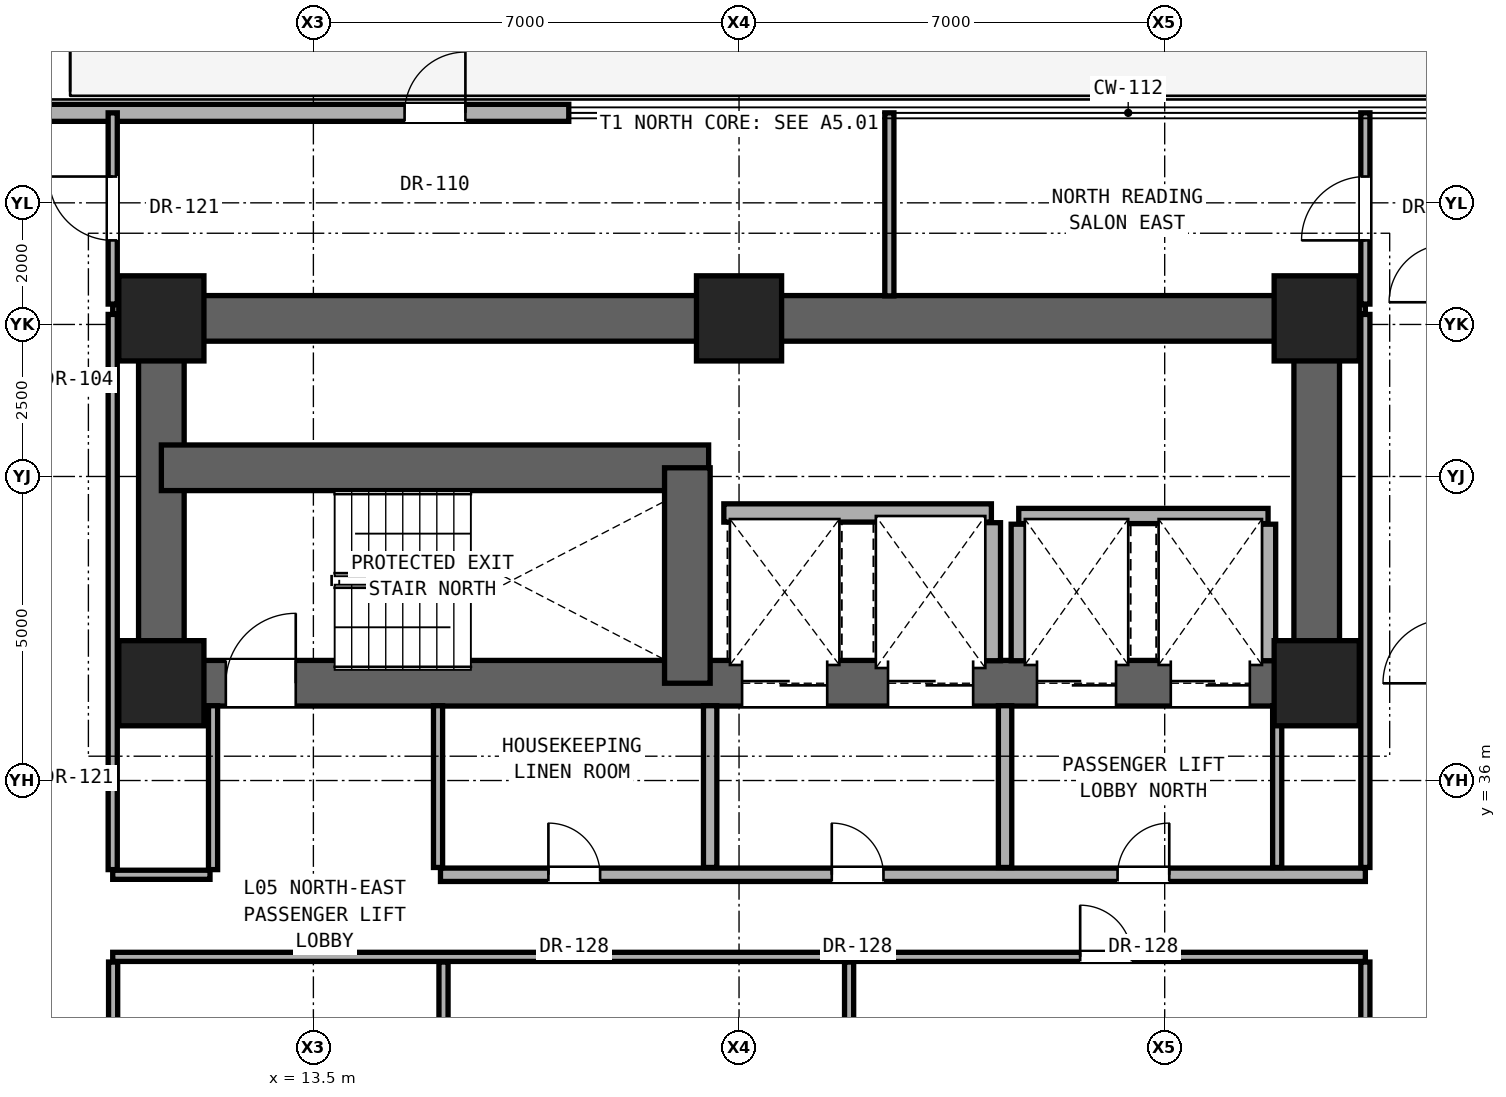
"""IFC4 building model, lengths in metres.
Left out: names, types, materials, properties, quantities, classifications, styles, units other than length and angle.
Written with IfcOpenShell. Run it as: python <this file> out.ifc"""

import sys

from ifc_helpers import new_model, si_unit, direction, frame, frame_2d, origin, origin_2d, place, context, subcontext, project, spatial, rectangle, extrude, element, fill, save


model = new_model("IFC4")
c1 = context("Model", 3, precision=1e-05, world=origin(), true_north=direction((0.0, 1.0)))
c2 = subcontext(c1, "Body", "Model", "MODEL_VIEW")
j1 = project(units=[si_unit("LENGTHUNIT", "METRE"), si_unit("PLANEANGLEUNIT", "RADIAN")], contexts=[c1])
p1 = place(None, origin())
s1 = spatial("IfcSite", under=j1, at=p1, CompositionType="ELEMENT")
p2 = place(p1, origin())
s2 = spatial("IfcBuilding", under=s1, at=p2, CompositionType="ELEMENT")
p3 = place(p2, frame((0.0, 0.0, 22.4)))
s3 = spatial("IfcBuildingStorey", under=s2, at=p3, CompositionType="ELEMENT", Elevation=22.4)
for number, where, z_axis, x_axis in (
    (1, (11.0, 37.6, 0.0), (0.0, 0.0, 1.0), (1.0, 0.0, 0.0)),
    (2, (30.0, 37.6, 0.0), (0.0, 0.0, 1.0), (1.0, 0.0, 0.0)),
    (3, (11.0, 43.6, 0.0), (0.0, 0.0, 1.0), (1.0, 0.0, 0.0)),
    (4, (20.5, 43.6, 0.0), (0.0, 0.0, 1.0), (1.0, 0.0, 0.0)),
    (5, (30.0, 43.6, 0.0), (0.0, 0.0, 1.0), (1.0, 0.0, 0.0)),
):
    element("IfcColumn", number, at=place(p3, frame(where, z_axis=z_axis, x_axis=x_axis)), inside=s3, PredefinedType="COLUMN", context=c2, shape_type="SweptSolid", body=[
        extrude(rectangle(XDim=1.4, YDim=1.4, at=origin_2d()), origin(), (0.0, 0.0, 1.0), 3.3),
    ])
p4 = place(p3, frame((11.0, 43.6, 0.0), z_axis=(0.0, 0.0, 1.0), x_axis=(1.0, 0.0, 0.0)))
e6 = element("IfcWall", 6, at=p4, inside=s3, PredefinedType="SHEAR", context=c2, shape_type="SweptSolid", body=[
    extrude(rectangle(XDim=19.0, YDim=0.75, at=frame_2d((9.5, 0.0))), origin(), (0.0, 0.0, 1.0), 3.06),
])
for number, where, z_axis, x_axis in (
    (7, (11.0, 37.6, 0.0), (0.0, 0.0, 1.0), (0.0, 1.0, 0.0)),
    (8, (30.0, 37.6, 0.0), (0.0, 0.0, 1.0), (0.0, 1.0, 0.0)),
):
    element("IfcWall", number, at=place(p3, frame(where, z_axis=z_axis, x_axis=x_axis)), inside=s3, PredefinedType="SHEAR", context=c2, shape_type="SweptSolid", body=[
        extrude(rectangle(XDim=6.0, YDim=0.75, at=frame_2d((3.0, 0.0))), origin(), (0.0, 0.0, 1.0), 3.06),
    ])
p5 = place(p3, frame((11.0, 37.6, 0.0), z_axis=(0.0, 0.0, 1.0), x_axis=(1.0, 0.0, 0.0)))
e9 = element("IfcWall", 9, at=p5, inside=s3, PredefinedType="SHEAR", context=c2, shape_type="SweptSolid", body=[
    extrude(rectangle(XDim=19.0, YDim=0.75, at=frame_2d((9.5, 0.0))), origin(), (0.0, 0.0, 1.0), 3.06),
])
p6 = place(p5, frame((1.06, 0.0, 0.0)))
e10 = element("IfcOpeningElement", 10, at=p6, cuts=e9, PredefinedType="OPENING", context=c2, shape_type="SweptSolid", body=[
    extrude(rectangle(XDim=1.15, YDim=2.2, at=frame_2d((0.575, 1.1))), frame((0.0, 0.385, 0.0), z_axis=(0.0, -1.0, 0.0), x_axis=(1.0, 0.0, 0.0)), (0.0, 0.0, 1.0), 0.77),
])
p7 = place(p5, frame((9.55, 0.0, 0.0)))
e11 = element("IfcOpeningElement", 11, at=p7, cuts=e9, PredefinedType="OPENING", context=c2, shape_type="SweptSolid", body=[
    extrude(rectangle(XDim=1.4, YDim=2.35, at=frame_2d((0.7, 1.175))), frame((0.0, 0.385, 0.0), z_axis=(0.0, -1.0, 0.0), x_axis=(1.0, 0.0, 0.0)), (0.0, 0.0, 1.0), 0.77),
])
p8 = place(p5, frame((11.95, 0.0, 0.0)))
e12 = element("IfcOpeningElement", 12, at=p8, cuts=e9, PredefinedType="OPENING", context=c2, shape_type="SweptSolid", body=[
    extrude(rectangle(XDim=1.4, YDim=2.35, at=frame_2d((0.7, 1.175))), frame((0.0, 0.385, 0.0), z_axis=(0.0, -1.0, 0.0), x_axis=(1.0, 0.0, 0.0)), (0.0, 0.0, 1.0), 0.77),
])
p9 = place(p5, frame((14.4, 0.0, 0.0)))
e13 = element("IfcOpeningElement", 13, at=p9, cuts=e9, PredefinedType="OPENING", context=c2, shape_type="SweptSolid", body=[
    extrude(rectangle(XDim=1.3, YDim=2.3, at=frame_2d((0.65, 1.15))), frame((0.0, 0.385, 0.0), z_axis=(0.0, -1.0, 0.0), x_axis=(1.0, 0.0, 0.0)), (0.0, 0.0, 1.0), 0.77),
])
p10 = place(p5, frame((16.6, 0.0, 0.0)))
e14 = element("IfcOpeningElement", 14, at=p10, cuts=e9, PredefinedType="OPENING", context=c2, shape_type="SweptSolid", body=[
    extrude(rectangle(XDim=1.3, YDim=2.3, at=frame_2d((0.65, 1.15))), frame((0.0, 0.385, 0.0), z_axis=(0.0, -1.0, 0.0), x_axis=(1.0, 0.0, 0.0)), (0.0, 0.0, 1.0), 0.77),
])
p11 = place(p3, frame((11.0, 41.143, 0.0), z_axis=(0.0, 0.0, 1.0), x_axis=(1.0, 0.0, 0.0)))
e15 = element("IfcWall", 15, at=p11, inside=s3, PredefinedType="SHEAR", context=c2, shape_type="SweptSolid", body=[
    extrude(rectangle(XDim=9.0, YDim=0.75, at=frame_2d((4.5, 0.0))), origin(), (0.0, 0.0, 1.0), 3.06),
])
p12 = place(p3, frame((19.65, 37.6, 0.0), z_axis=(0.0, 0.0, 1.0), x_axis=(0.0, 1.0, 0.0)))
e16 = element("IfcWall", 16, at=p12, inside=s3, PredefinedType="SHEAR", context=c2, shape_type="SweptSolid", body=[
    extrude(rectangle(XDim=3.543, YDim=0.75, at=frame_2d((1.771, 0.0))), origin(), (0.0, 0.0, 1.0), 3.06),
])
p13 = place(p3, frame((4.9, 46.98, 0.0), z_axis=(0.0, 0.0, 1.0), x_axis=(1.0, 0.0, 0.0)))
e17 = element("IfcWall", 17, at=p13, inside=s3, PredefinedType="SOLIDWALL", context=c2, shape_type="SweptSolid", body=[
    extrude(rectangle(XDim=12.8, YDim=0.28, at=frame_2d((6.4, 0.0))), origin(), (0.0, 0.0, 1.0), 3.04),
])
p14 = place(p13, frame((10.1, 0.0, 0.0)))
e18 = element("IfcOpeningElement", 18, at=p14, cuts=e17, PredefinedType="OPENING", context=c2, shape_type="SweptSolid", body=[
    extrude(rectangle(XDim=1.0, YDim=2.15, at=frame_2d((0.5, 1.075))), frame((0.0, 0.15, 0.0), z_axis=(0.0, -1.0, 0.0), x_axis=(1.0, 0.0, 0.0)), (0.0, 0.0, 1.0), 0.3),
])
p15 = place(p3, frame((10.2, 33.1, 0.0), z_axis=(0.0, 0.0, 1.0), x_axis=(1.0, 0.0, 0.0)))
e19 = element("IfcWall", 19, at=p15, inside=s3, PredefinedType="PARTITIONING", context=c2, shape_type="SweptSolid", body=[
    extrude(rectangle(XDim=20.6, YDim=0.15, at=frame_2d((10.3, 0.0))), origin(), (0.0, 0.0, 1.0), 2.104),
])
p16 = place(p15, frame((15.91, 0.0, 0.0)))
e20 = element("IfcOpeningElement", 20, at=p16, cuts=e19, PredefinedType="OPENING", context=c2, shape_type="SweptSolid", body=[
    extrude(rectangle(XDim=0.85, YDim=2.01, at=frame_2d((0.425, 1.005))), frame((0.0, 0.085, 0.0), z_axis=(0.0, -1.0, 0.0), x_axis=(1.0, 0.0, 0.0)), (0.0, 0.0, 1.0), 0.17),
])
p17 = place(p3, frame((10.2, 34.45, 0.0), z_axis=(0.0, 0.0, 1.0), x_axis=(1.0, 0.0, 0.0)))
e21 = element("IfcWall", 21, at=p17, inside=s3, PredefinedType="PARTITIONING", context=c2, shape_type="SweptSolid", body=[
    extrude(rectangle(XDim=1.6, YDim=0.15, at=frame_2d((0.8, 0.0))), origin(), (0.0, 0.0, 1.0), 2.104),
])
p18 = place(p3, frame((15.59, 34.45, 0.0), z_axis=(0.0, 0.0, 1.0), x_axis=(1.0, 0.0, 0.0)))
e22 = element("IfcWall", 22, at=p18, inside=s3, PredefinedType="SOLIDWALL", context=c2, shape_type="SweptSolid", body=[
    extrude(rectangle(XDim=15.21, YDim=0.22, at=frame_2d((7.605, 0.0))), origin(), (0.0, 0.0, 1.0), 2.104),
])
p19 = place(p18, frame((6.435, 0.0, 0.0)))
e23 = element("IfcOpeningElement", 23, at=p19, cuts=e22, PredefinedType="OPENING", context=c2, shape_type="SweptSolid", body=[
    extrude(rectangle(XDim=0.85, YDim=2.01, at=frame_2d((0.425, 1.005))), frame((0.0, 0.12, 0.0), z_axis=(0.0, -1.0, 0.0), x_axis=(1.0, 0.0, 0.0)), (0.0, 0.0, 1.0), 0.24),
])
p20 = place(p18, frame((11.135, 0.0, 0.0)))
e24 = element("IfcOpeningElement", 24, at=p20, cuts=e22, PredefinedType="OPENING", context=c2, shape_type="SweptSolid", body=[
    extrude(rectangle(XDim=0.85, YDim=2.01, at=frame_2d((0.425, 1.005))), frame((0.0, 0.12, 0.0), z_axis=(0.0, -1.0, 0.0), x_axis=(1.0, 0.0, 0.0)), (0.0, 0.0, 1.0), 0.24),
])
p21 = place(p18, frame((1.775, 0.0, 0.0)))
e25 = element("IfcOpeningElement", 25, at=p21, cuts=e22, PredefinedType="OPENING", context=c2, shape_type="SweptSolid", body=[
    extrude(rectangle(XDim=0.85, YDim=2.01, at=frame_2d((0.425, 1.005))), frame((0.0, 0.12, 0.0), z_axis=(0.0, -1.0, 0.0), x_axis=(1.0, 0.0, 0.0)), (0.0, 0.0, 1.0), 0.24),
])
p22 = place(p3, frame((25.1, 40.35, 0.0), z_axis=(0.0, 0.0, 1.0), x_axis=(1.0, 0.0, 0.0)))
e26 = element("IfcWall", 26, at=p22, inside=s3, PredefinedType="SOLIDWALL", context=c2, shape_type="SweptSolid", body=[
    extrude(rectangle(XDim=4.1, YDim=0.25, at=frame_2d((2.05, 0.0))), origin(), (0.0, 0.0, 1.0), 3.06),
])
p23 = place(p3, frame((20.25, 40.4, 0.0), z_axis=(0.0, 0.0, 1.0), x_axis=(1.0, 0.0, 0.0)))
e27 = element("IfcWall", 27, at=p23, inside=s3, PredefinedType="SOLIDWALL", context=c2, shape_type="SweptSolid", body=[
    extrude(rectangle(XDim=4.4, YDim=0.3, at=frame_2d((2.2, 0.0))), origin(), (0.0, 0.0, 1.0), 3.06),
])
for number, where, z_axis, x_axis in (
    (28, (10.2, 43.75, 0.0), (0.0, 0.0, 1.0), (1.0, 0.0, 0.0)),
    (29, (30.37, 43.75, 0.0), (0.0, 0.0, 1.0), (1.0, 0.0, 0.0)),
):
    element("IfcWall", number, at=place(p3, frame(where, z_axis=z_axis, x_axis=x_axis)), inside=s3, PredefinedType="PARTITIONING", context=c2, shape_type="SweptSolid", body=[
        extrude(rectangle(XDim=0.43, YDim=0.15, at=frame_2d((0.215, 0.0))), origin(), (0.0, 0.0, 1.0), 3.06),
    ])
p24 = place(p3, frame((10.207, 22.935, 0.0), z_axis=(0.0, 0.0, 1.0), x_axis=(0.0, 1.0, 0.0)))
e30 = element("IfcWall", 30, at=p24, inside=s3, PredefinedType="PARTITIONING", context=c2, shape_type="SweptSolid", body=[
    extrude(rectangle(XDim=10.08, YDim=0.15, at=frame_2d((5.04, 0.0))), origin(), (0.0, 0.0, 1.0), 2.279),
])
p25 = place(p24, frame((4.565, 0.0, 0.0)))
e31 = element("IfcOpeningElement", 31, at=p25, cuts=e30, PredefinedType="OPENING", context=c2, shape_type="SweptSolid", body=[
    extrude(rectangle(XDim=0.95, YDim=2.15, at=frame_2d((0.475, 1.075))), frame((0.0, 0.085, 0.0), z_axis=(0.0, -1.0, 0.0), x_axis=(1.0, 0.0, 0.0)), (0.0, 0.0, 1.0), 0.17),
])
p26 = place(p3, frame((10.2, 34.535, 0.0), z_axis=(0.0, 0.0, 1.0), x_axis=(0.0, 1.0, 0.0)))
e32 = element("IfcWall", 32, at=p26, inside=s3, PredefinedType="PARTITIONING", context=c2, shape_type="SweptSolid", body=[
    extrude(rectangle(XDim=9.13, YDim=0.15, at=frame_2d((4.565, 0.0))), origin(), (0.0, 0.0, 1.0), 2.436),
])
p27 = place(p3, frame((10.2, 43.835, 0.0), z_axis=(0.0, 0.0, 1.0), x_axis=(0.0, 1.0, 0.0)))
e33 = element("IfcWall", 33, at=p27, inside=s3, PredefinedType="PARTITIONING", context=c2, shape_type="SweptSolid", body=[
    extrude(rectangle(XDim=3.145, YDim=0.15, at=frame_2d((1.573, 0.0))), origin(), (0.0, 0.0, 1.0), 3.06),
])
p28 = place(p27, frame((1.048, 0.0, 0.0)))
e34 = element("IfcOpeningElement", 34, at=p28, cuts=e33, PredefinedType="OPENING", context=c2, shape_type="SweptSolid", body=[
    extrude(rectangle(XDim=1.05, YDim=2.2, at=frame_2d((0.525, 1.1))), frame((0.0, 0.085, 0.0), z_axis=(0.0, -1.0, 0.0), x_axis=(1.0, 0.0, 0.0)), (0.0, 0.0, 1.0), 0.17),
])
p29 = place(p3, frame((11.85, 34.535, 0.0), z_axis=(0.0, 0.0, 1.0), x_axis=(0.0, 1.0, 0.0)))
e35 = element("IfcWall", 35, at=p29, inside=s3, PredefinedType="PARTITIONING", context=c2, shape_type="SweptSolid", body=[
    extrude(rectangle(XDim=2.695, YDim=0.15, at=frame_2d((1.348, 0.0))), origin(), (0.0, 0.0, 1.0), 3.06),
])
p30 = place(p3, frame((15.64, 22.935, 0.0), z_axis=(0.0, 0.0, 1.0), x_axis=(0.0, 1.0, 0.0)))
e36 = element("IfcWall", 36, at=p30, inside=s3, PredefinedType="PARTITIONING", context=c2, shape_type="SweptSolid", body=[
    extrude(rectangle(XDim=10.08, YDim=0.15, at=frame_2d((5.04, 0.0))), origin(), (0.0, 0.0, 1.0), 2.104),
])
p31 = place(p3, frame((15.55, 34.57, 0.0), z_axis=(0.0, 0.0, 1.0), x_axis=(0.0, 1.0, 0.0)))
e37 = element("IfcWall", 37, at=p31, inside=s3, PredefinedType="PARTITIONING", context=c2, shape_type="SweptSolid", body=[
    extrude(rectangle(XDim=2.66, YDim=0.15, at=frame_2d((1.33, 0.0))), origin(), (0.0, 0.0, 1.0), 2.589),
])
p32 = place(p3, frame((20.025, 34.57, 0.0), z_axis=(0.0, 0.0, 1.0), x_axis=(0.0, 1.0, 0.0)))
e38 = element("IfcWall", 38, at=p32, inside=s3, PredefinedType="SOLIDWALL", context=c2, shape_type="SweptSolid", body=[
    extrude(rectangle(XDim=2.66, YDim=0.22, at=frame_2d((1.33, 0.0))), origin(), (0.0, 0.0, 1.0), 3.06),
])
p33 = place(p3, frame((22.31, 19.985, 0.0), z_axis=(0.0, 0.0, 1.0), x_axis=(0.0, 1.0, 0.0)))
e39 = element("IfcWall", 39, at=p33, inside=s3, PredefinedType="PARTITIONING", context=c2, shape_type="SweptSolid", body=[
    extrude(rectangle(XDim=13.03, YDim=0.15, at=frame_2d((6.515, 0.0))), origin(), (0.0, 0.0, 1.0), 2.104),
])
p34 = place(p3, frame((22.972, 43.97, 0.0), z_axis=(0.0, 0.0, 1.0), x_axis=(0.0, 1.0, 0.0)))
e40 = element("IfcWall", 40, at=p34, inside=s3, PredefinedType="PARTITIONING", context=c2, shape_type="SweptSolid", body=[
    extrude(rectangle(XDim=3.01, YDim=0.15, at=frame_2d((1.505, 0.0))), origin(), (0.0, 0.0, 1.0), 3.06),
])
p35 = place(p3, frame((24.65, 37.97, 0.0), z_axis=(0.0, 0.0, 1.0), x_axis=(0.0, 1.0, 0.0)))
e41 = element("IfcWall", 41, at=p35, inside=s3, PredefinedType="SOLIDWALL", context=c2, shape_type="SweptSolid", body=[
    extrude(rectangle(XDim=2.27, YDim=0.3, at=frame_2d((1.135, 0.0))), origin(), (0.0, 0.0, 1.0), 3.06),
])
p36 = place(p3, frame((24.875, 34.57, 0.0), z_axis=(0.0, 0.0, 1.0), x_axis=(0.0, 1.0, 0.0)))
e42 = element("IfcWall", 42, at=p36, inside=s3, PredefinedType="SOLIDWALL", context=c2, shape_type="SweptSolid", body=[
    extrude(rectangle(XDim=2.66, YDim=0.22, at=frame_2d((1.33, 0.0))), origin(), (0.0, 0.0, 1.0), 3.06),
])
p37 = place(p3, frame((25.1, 37.97, 0.0), z_axis=(0.0, 0.0, 1.0), x_axis=(0.0, 1.0, 0.0)))
e43 = element("IfcWall", 43, at=p37, inside=s3, PredefinedType="SOLIDWALL", context=c2, shape_type="SweptSolid", body=[
    extrude(rectangle(XDim=2.245, YDim=0.25, at=frame_2d((1.123, 0.0))), origin(), (0.0, 0.0, 1.0), 3.06),
])
p38 = place(p3, frame((29.35, 34.57, 0.0), z_axis=(0.0, 0.0, 1.0), x_axis=(0.0, 1.0, 0.0)))
e44 = element("IfcWall", 44, at=p38, inside=s3, PredefinedType="PARTITIONING", context=c2, shape_type="SweptSolid", body=[
    extrude(rectangle(XDim=2.66, YDim=0.15, at=frame_2d((1.33, 0.0))), origin(), (0.0, 0.0, 1.0), 3.06),
])
p39 = place(p3, frame((29.2, 37.97, 0.0), z_axis=(0.0, 0.0, 1.0), x_axis=(0.0, 1.0, 0.0)))
e45 = element("IfcWall", 45, at=p39, inside=s3, PredefinedType="SOLIDWALL", context=c2, shape_type="SweptSolid", body=[
    extrude(rectangle(XDim=2.245, YDim=0.25, at=frame_2d((1.123, 0.0))), origin(), (0.0, 0.0, 1.0), 3.06),
])
p40 = place(p3, frame((30.8, 19.985, 0.0), z_axis=(0.0, 0.0, 1.0), x_axis=(0.0, 1.0, 0.0)))
e46 = element("IfcWall", 46, at=p40, inside=s3, PredefinedType="PARTITIONING", context=c2, shape_type="SweptSolid", body=[
    extrude(rectangle(XDim=13.03, YDim=0.15, at=frame_2d((6.515, 0.0))), origin(), (0.0, 0.0, 1.0), 2.279),
])
p41 = place(p3, frame((30.8, 34.57, 0.0), z_axis=(0.0, 0.0, 1.0), x_axis=(0.0, 1.0, 0.0)))
e47 = element("IfcWall", 47, at=p41, inside=s3, PredefinedType="PARTITIONING", context=c2, shape_type="SweptSolid", body=[
    extrude(rectangle(XDim=9.095, YDim=0.15, at=frame_2d((4.547, 0.0))), origin(), (0.0, 0.0, 1.0), 2.436),
])
p42 = place(p3, frame((30.8, 43.835, 0.0), z_axis=(0.0, 0.0, 1.0), x_axis=(0.0, 1.0, 0.0)))
e48 = element("IfcWall", 48, at=p42, inside=s3, PredefinedType="PARTITIONING", context=c2, shape_type="SweptSolid", body=[
    extrude(rectangle(XDim=3.145, YDim=0.15, at=frame_2d((1.573, 0.0))), origin(), (0.0, 0.0, 1.0), 3.06),
])
p43 = place(p42, frame((1.048, 0.0, 0.0)))
e49 = element("IfcOpeningElement", 49, at=p43, cuts=e48, PredefinedType="OPENING", context=c2, shape_type="SweptSolid", body=[
    extrude(rectangle(XDim=1.05, YDim=2.2, at=frame_2d((0.525, 1.1))), frame((0.0, 0.085, 0.0), z_axis=(0.0, -1.0, 0.0), x_axis=(1.0, 0.0, 0.0)), (0.0, 0.0, 1.0), 0.17),
])
p44 = place(p14, origin())
e50 = element("IfcDoor", 50, at=p44, inside=s3, OperationType="SINGLE_SWING_RIGHT", PredefinedType="DOOR", context=c2, shape_type="SweptSolid", body=[
    extrude(rectangle(XDim=1.0, YDim=2.15, at=frame_2d((0.5, 1.075))), frame((0.0, 0.025, 0.0), z_axis=(0.0, -1.0, 0.0), x_axis=(1.0, 0.0, 0.0)), (0.0, 0.0, 1.0), 0.05),
])
fill(e18, e50)
p45 = place(p6, origin())
e51 = element("IfcDoor", 51, at=p45, inside=s3, OperationType="SINGLE_SWING_RIGHT", PredefinedType="DOOR", context=c2, shape_type="SweptSolid", body=[
    extrude(rectangle(XDim=1.15, YDim=2.2, at=frame_2d((0.575, 1.1))), frame((0.0, 0.025, 0.0), z_axis=(0.0, -1.0, 0.0), x_axis=(1.0, 0.0, 0.0)), (0.0, 0.0, 1.0), 0.05),
])
fill(e10, e51)
p46 = place(p19, origin())
e52 = element("IfcDoor", 52, at=p46, inside=s3, OperationType="SINGLE_SWING_LEFT", PredefinedType="DOOR", context=c2, shape_type="SweptSolid", body=[
    extrude(rectangle(XDim=0.85, YDim=2.01, at=frame_2d((0.425, 1.005))), frame((0.0, 0.025, 0.0), z_axis=(0.0, -1.0, 0.0), x_axis=(1.0, 0.0, 0.0)), (0.0, 0.0, 1.0), 0.05),
])
fill(e23, e52)
p47 = place(p20, origin())
e53 = element("IfcDoor", 53, at=p47, inside=s3, OperationType="SINGLE_SWING_RIGHT", PredefinedType="DOOR", context=c2, shape_type="SweptSolid", body=[
    extrude(rectangle(XDim=0.85, YDim=2.01, at=frame_2d((0.425, 1.005))), frame((0.0, 0.025, 0.0), z_axis=(0.0, -1.0, 0.0), x_axis=(1.0, 0.0, 0.0)), (0.0, 0.0, 1.0), 0.05),
])
fill(e24, e53)
p48 = place(p21, origin())
e54 = element("IfcDoor", 54, at=p48, inside=s3, OperationType="SINGLE_SWING_LEFT", PredefinedType="DOOR", context=c2, shape_type="SweptSolid", body=[
    extrude(rectangle(XDim=0.85, YDim=2.01, at=frame_2d((0.425, 1.005))), frame((0.0, 0.025, 0.0), z_axis=(0.0, -1.0, 0.0), x_axis=(1.0, 0.0, 0.0)), (0.0, 0.0, 1.0), 0.05),
])
fill(e25, e54)
p49 = place(p16, origin())
e55 = element("IfcDoor", 55, at=p49, inside=s3, OperationType="SINGLE_SWING_LEFT", PredefinedType="DOOR", context=c2, shape_type="SweptSolid", body=[
    extrude(rectangle(XDim=0.85, YDim=2.01, at=frame_2d((0.425, 1.005))), frame((0.0, 0.025, 0.0), z_axis=(0.0, -1.0, 0.0), x_axis=(1.0, 0.0, 0.0)), (0.0, 0.0, 1.0), 0.05),
])
fill(e20, e55)
p50 = place(p28, origin())
e56 = element("IfcDoor", 56, at=p50, inside=s3, OperationType="SINGLE_SWING_RIGHT", PredefinedType="DOOR", context=c2, shape_type="SweptSolid", body=[
    extrude(rectangle(XDim=1.05, YDim=2.2, at=frame_2d((0.525, 1.1))), frame((0.0, 0.025, 0.0), z_axis=(0.0, -1.0, 0.0), x_axis=(1.0, 0.0, 0.0)), (0.0, 0.0, 1.0), 0.05),
])
fill(e34, e56)
p51 = place(p43, origin())
e57 = element("IfcDoor", 57, at=p51, inside=s3, OperationType="SINGLE_SWING_LEFT", PredefinedType="DOOR", context=c2, shape_type="SweptSolid", body=[
    extrude(rectangle(XDim=1.05, YDim=2.2, at=frame_2d((0.525, 1.1))), frame((0.0, 0.025, 0.0), z_axis=(0.0, -1.0, 0.0), x_axis=(1.0, 0.0, 0.0)), (0.0, 0.0, 1.0), 0.05),
])
fill(e49, e57)
p52 = place(p7, origin())
e58 = element("IfcDoor", 58, at=p52, inside=s3, OperationType="DOUBLE_DOOR_SLIDING", PredefinedType="DOOR", context=c2, shape_type="SweptSolid", body=[
    extrude(rectangle(XDim=1.4, YDim=2.35, at=frame_2d((0.7, 1.175))), frame((0.0, 0.025, 0.0), z_axis=(0.0, -1.0, 0.0), x_axis=(1.0, 0.0, 0.0)), (0.0, 0.0, 1.0), 0.05),
])
fill(e11, e58)
p53 = place(p8, origin())
e59 = element("IfcDoor", 59, at=p53, inside=s3, OperationType="DOUBLE_DOOR_SLIDING", PredefinedType="DOOR", context=c2, shape_type="SweptSolid", body=[
    extrude(rectangle(XDim=1.4, YDim=2.35, at=frame_2d((0.7, 1.175))), frame((0.0, 0.025, 0.0), z_axis=(0.0, -1.0, 0.0), x_axis=(1.0, 0.0, 0.0)), (0.0, 0.0, 1.0), 0.05),
])
fill(e12, e59)
p54 = place(p9, origin())
e60 = element("IfcDoor", 60, at=p54, inside=s3, OperationType="DOUBLE_DOOR_SLIDING", PredefinedType="DOOR", context=c2, shape_type="SweptSolid", body=[
    extrude(rectangle(XDim=1.3, YDim=2.3, at=frame_2d((0.65, 1.15))), frame((0.0, 0.025, 0.0), z_axis=(0.0, -1.0, 0.0), x_axis=(1.0, 0.0, 0.0)), (0.0, 0.0, 1.0), 0.05),
])
fill(e13, e60)
p55 = place(p10, origin())
e61 = element("IfcDoor", 61, at=p55, inside=s3, OperationType="DOUBLE_DOOR_SLIDING", PredefinedType="DOOR", context=c2, shape_type="SweptSolid", body=[
    extrude(rectangle(XDim=1.3, YDim=2.3, at=frame_2d((0.65, 1.15))), frame((0.0, 0.025, 0.0), z_axis=(0.0, -1.0, 0.0), x_axis=(1.0, 0.0, 0.0)), (0.0, 0.0, 1.0), 0.05),
])
fill(e14, e61)
save(model, sys.argv[1])
